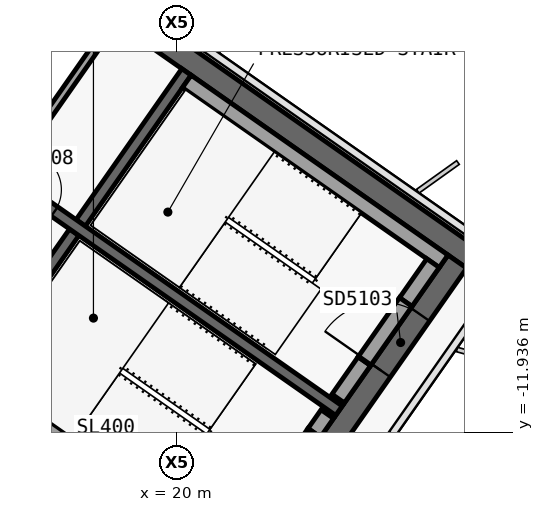
"""IFC4 building model, lengths in metres.
Left out: names, types, materials, properties, quantities, classifications, styles, units other than length and angle.
Written with IfcOpenShell. Run it as: python <this file> out.ifc"""

import sys

from ifc_helpers import new_model, si_unit, direction, frame, frame_2d, origin, place, context, subcontext, project, spatial, polyline, rectangle, outline, extrude, element, fill, save


model = new_model("IFC4")
c1 = context("Model", 3, precision=1e-05, world=origin(), true_north=direction((0.0, 1.0)))
c2 = subcontext(c1, "Body", "Model", "MODEL_VIEW")
j1 = project(units=[si_unit("LENGTHUNIT", "METRE"), si_unit("PLANEANGLEUNIT", "RADIAN")], contexts=[c1])
p1 = place(None, origin())
s1 = spatial("IfcSite", under=j1, at=p1, CompositionType="ELEMENT")
p2 = place(p1, origin())
s2 = spatial("IfcBuilding", under=s1, at=p2, CompositionType="ELEMENT")
p3 = place(p2, frame((0.0, 0.0, 287.8)))
s3 = spatial("IfcBuildingStorey", under=s2, at=p3, CompositionType="ELEMENT", Elevation=287.8)
p4 = place(p3, frame((0.028, 12.066, 0.0), z_axis=(0.0, 0.0, 1.0), x_axis=(0.819151382952, -0.573577380837, 0.0)))
e1 = element("IfcWall", 1, at=p4, inside=s3, PredefinedType="SHEAR", context=c2, shape_type="SweptSolid", body=[
    extrude(outline(polyline([(33.898, 0.3), (0.0, 0.3), (0.42, -0.3), (33.898, -0.3), (33.898, 0.3)])), origin(), (0.0, 0.0, 1.0), 3.9),
])
p5 = place(p3, frame((0.028, -0.874, 0.0), z_axis=(0.0, 0.0, 1.0), x_axis=(0.819150035022, -0.573579305871, 0.0)))
e2 = element("IfcWall", 2, at=p5, inside=s3, PredefinedType="SHEAR", context=c2, shape_type="SweptSolid", body=[
    extrude(outline(polyline([(26.476, 0.3), (0.0, 0.3), (0.42, -0.3), (26.476, -0.3), (26.476, 0.3)])), origin(), (0.0, 0.0, 1.0), 3.9),
])
p6 = place(p5, frame((1.026, 0.0, 0.0)))
e3 = element("IfcOpeningElement", 3, at=p6, cuts=e2, PredefinedType="OPENING", context=c2, shape_type="SweptSolid", body=[
    extrude(rectangle(XDim=1.5, YDim=2.1, at=frame_2d((0.75, 1.05))), frame((0.0, 0.31, 0.0), z_axis=(0.0, -1.0, 0.0), x_axis=(1.0, 0.0, 0.0)), (0.0, 0.0, 1.0), 0.62),
])
p7 = place(p5, frame((12.226, 0.0, 0.0)))
e4 = element("IfcOpeningElement", 4, at=p7, cuts=e2, PredefinedType="OPENING", context=c2, shape_type="SweptSolid", body=[
    extrude(rectangle(XDim=1.5, YDim=2.1, at=frame_2d((0.75, 1.05))), frame((0.0, 0.31, 0.0), z_axis=(0.0, -1.0, 0.0), x_axis=(1.0, 0.0, 0.0)), (0.0, 0.0, 1.0), 0.62),
])
p8 = place(p3, frame((21.642, -15.642, 0.0), z_axis=(0.0, 0.0, 1.0), x_axis=(0.573586866468, 0.819144740944, 0.0)))
e5 = element("IfcWall", 5, at=p8, inside=s3, PredefinedType="SHEAR", context=c2, shape_type="SweptSolid", body=[
    extrude(outline(polyline([(10.0, 0.3), (0.0, 0.3), (0.0, -0.3), (10.0, -0.3), (10.0, 0.3)])), origin(), (0.0, 0.0, 1.0), 3.9),
])
p9 = place(p8, frame((6.5, 0.0, 0.0)))
e6 = element("IfcOpeningElement", 6, at=p9, cuts=e5, PredefinedType="OPENING", context=c2, shape_type="SweptSolid", body=[
    extrude(rectangle(XDim=1.8, YDim=2.1, at=frame_2d((0.9, 1.05))), frame((0.0, 0.31, 0.0), z_axis=(0.0, -1.0, 0.0), x_axis=(1.0, 0.0, 0.0)), (0.0, 0.0, 1.0), 0.62),
])
p10 = place(p8, frame((2.3, 0.0, 0.0)))
e7 = element("IfcOpeningElement", 7, at=p10, cuts=e5, PredefinedType="OPENING", context=c2, shape_type="SweptSolid", body=[
    extrude(rectangle(XDim=1.8, YDim=2.1, at=frame_2d((0.9, 1.05))), frame((0.0, 0.31, 0.0), z_axis=(0.0, -1.0, 0.0), x_axis=(1.0, 0.0, 0.0)), (0.0, 0.0, 1.0), 0.62),
])
p11 = place(p3, frame((14.515, -10.652, 0.0), z_axis=(0.0, 0.0, 1.0), x_axis=(0.573560315113, 0.819163332265, 0.0)))
e8 = element("IfcWall", 8, at=p11, inside=s3, PredefinedType="SHEAR", context=c2, shape_type="SweptSolid", body=[
    extrude(outline(polyline([(0.0, 0.15), (0.0, -0.15), (4.85, -0.15), (4.85, 0.15), (0.0, 0.15)])), origin(), (0.0, 0.0, 1.0), 3.9),
])
p12 = place(p3, frame((17.469, -6.433, 0.0), z_axis=(0.0, 0.0, 1.0), x_axis=(0.573594092424, 0.81913968109, 0.0)))
e9 = element("IfcWall", 9, at=p12, inside=s3, PredefinedType="SHEAR", context=c2, shape_type="SweptSolid", body=[
    extrude(outline(polyline([(4.85, -0.15), (4.85, 0.15), (0.0, 0.15), (0.0, -0.15), (4.85, -0.15)])), origin(), (0.0, 0.0, 1.0), 3.9),
])
p13 = place(p3, frame((2.638, 3.768, 0.0), z_axis=(0.0, 0.0, 1.0), x_axis=(0.819155014212, -0.573572194837, 0.0)))
e10 = element("IfcWall", 10, at=p13, inside=s3, PredefinedType="SHEAR", context=c2, shape_type="SweptSolid", body=[
    extrude(outline(polyline([(0.0, 0.15), (0.0, -0.15), (26.4, -0.15), (26.4, 0.15), (0.0, 0.15)])), origin(), (0.0, 0.0, 1.0), 3.9),
])
p14 = place(p13, frame((9.637, 0.0, 0.0)))
e11 = element("IfcOpeningElement", 11, at=p14, cuts=e10, PredefinedType="OPENING", context=c2, shape_type="SweptSolid", body=[
    extrude(rectangle(XDim=1.2, YDim=2.1, at=frame_2d((0.6, 1.05))), frame((0.0, 0.16, 0.0), z_axis=(0.0, -1.0, 0.0), x_axis=(1.0, 0.0, 0.0)), (0.0, 0.0, 1.0), 0.32),
])
p15 = place(p13, frame((11.812, 0.0, 0.0)))
e12 = element("IfcOpeningElement", 12, at=p15, cuts=e10, PredefinedType="OPENING", context=c2, shape_type="SweptSolid", body=[
    extrude(rectangle(XDim=1.2, YDim=2.1, at=frame_2d((0.6, 1.05))), frame((0.0, 0.16, 0.0), z_axis=(0.0, -1.0, 0.0), x_axis=(1.0, 0.0, 0.0)), (0.0, 0.0, 1.0), 0.32),
])
p16 = place(p13, frame((13.988, 0.0, 0.0)))
e13 = element("IfcOpeningElement", 13, at=p16, cuts=e10, PredefinedType="OPENING", context=c2, shape_type="SweptSolid", body=[
    extrude(rectangle(XDim=1.2, YDim=2.1, at=frame_2d((0.6, 1.05))), frame((0.0, 0.16, 0.0), z_axis=(0.0, -1.0, 0.0), x_axis=(1.0, 0.0, 0.0)), (0.0, 0.0, 1.0), 0.32),
])
p17 = place(p13, frame((16.262, 0.0, 0.0)))
e14 = element("IfcOpeningElement", 14, at=p17, cuts=e10, PredefinedType="OPENING", context=c2, shape_type="SweptSolid", body=[
    extrude(rectangle(XDim=1.0, YDim=2.1, at=frame_2d((0.5, 1.05))), frame((0.0, 0.16, 0.0), z_axis=(0.0, -1.0, 0.0), x_axis=(1.0, 0.0, 0.0)), (0.0, 0.0, 1.0), 0.32),
])
p18 = place(p3, frame((15.565, -5.1, 0.0), z_axis=(0.0, 0.0, 1.0), x_axis=(0.573560315113, 0.819163332265, 0.0)))
e15 = element("IfcWall", 15, at=p18, inside=s3, PredefinedType="SOLIDWALL", context=c2, shape_type="SweptSolid", body=[
    extrude(rectangle(XDim=4.85, YDim=0.2, at=frame_2d((2.425, 0.0))), origin(), (0.0, 0.0, 1.0), 3.9),
])
p19 = place(p3, frame((20.259, -2.71, 0.0), z_axis=(0.0, 0.0, 1.0), x_axis=(0.81914849389, -0.573581506813, 0.0)))
e16 = element("IfcWall", 16, at=p19, inside=s3, PredefinedType="SOLIDWALL", context=c2, shape_type="SweptSolid", body=[
    extrude(rectangle(XDim=8.25, YDim=0.4, at=frame_2d((4.125, 0.0))), origin(), (0.0, 0.0, 1.0), 3.62),
])
p20 = place(p3, frame((24.244, -11.055, 0.0), z_axis=(0.0, 0.0, 1.0), x_axis=(0.573571582932, 0.819155442668, 0.0)))
e17 = element("IfcWall", 17, at=p20, inside=s3, PredefinedType="SOLIDWALL", context=c2, shape_type="SweptSolid", body=[
    extrude(rectangle(XDim=1.2, YDim=0.4, at=frame_2d((0.6, 0.0))), origin(), (0.0, 0.0, 1.0), 3.62),
])
p21 = place(p3, frame((26.022, -8.515, 0.0), z_axis=(0.0, 0.0, 1.0), x_axis=(0.573619628835, 0.819121798889, 0.0)))
e18 = element("IfcWall", 18, at=p21, inside=s3, PredefinedType="SOLIDWALL", context=c2, shape_type="SweptSolid", body=[
    extrude(rectangle(XDim=1.25, YDim=0.4, at=frame_2d((0.625, 0.0))), origin(), (0.0, 0.0, 1.0), 3.62),
])
p22 = place(p3, frame((24.932, -10.072, 2.15), z_axis=(0.0, 0.0, 1.0), x_axis=(0.573591692345, 0.819141361715, 0.0)))
e19 = element("IfcWall", 19, at=p22, inside=s3, PredefinedType="SOLIDWALL", context=c2, shape_type="SweptSolid", body=[
    extrude(rectangle(XDim=1.9, YDim=0.4, at=frame_2d((0.95, 0.0))), origin(), (0.0, 0.0, 1.0), 1.47),
])
p23 = place(p3, frame((14.753, -10.574, 0.0), z_axis=(0.0, 0.0, 1.0), x_axis=(0.819158229677, -0.573567602601, 0.0)))
e20 = element("IfcWall", 20, at=p23, inside=s3, PredefinedType="SOLIDWALL", context=c2, shape_type="SweptSolid", body=[
    extrude(rectangle(XDim=8.25, YDim=0.4, at=frame_2d((4.125, 0.0))), origin(), (0.0, 0.0, 1.0), 3.62),
])
p24 = place(p3, frame((23.613, -11.956, 0.0), z_axis=(0.0, 0.0, 1.0), x_axis=(0.573435029941, 0.819251039936, 0.0)))
e21 = element("IfcWall", 21, at=p24, inside=s3, PredefinedType="SOLIDWALL", context=c2, shape_type="SweptSolid", body=[
    extrude(rectangle(XDim=0.6, YDim=0.4, at=frame_2d((0.3, 0.0))), origin(), (0.0, 0.0, 1.0), 3.62),
])
p25 = place(p3, frame((22.523, -13.512, 2.15), z_axis=(0.0, 0.0, 1.0), x_axis=(0.573591692345, 0.819141361715, 0.0)))
e22 = element("IfcWall", 22, at=p25, inside=s3, PredefinedType="SOLIDWALL", context=c2, shape_type="SweptSolid", body=[
    extrude(rectangle(XDim=1.9, YDim=0.4, at=frame_2d((0.95, 0.0))), origin(), (0.0, 0.0, 1.0), 1.47),
])
p26 = place(p3, frame((20.513, -17.781, 0.0), z_axis=(0.0, 0.0, 1.0), x_axis=(-0.819153544995, 0.573574293115, 0.0)))
e23 = element("IfcWall", 23, at=p26, inside=s3, PredefinedType="PARTITIONING", context=c2, shape_type="SweptSolid", body=[
    extrude(rectangle(XDim=18.002, YDim=0.15, at=frame_2d((9.001, 0.0))), origin(), (0.0, 0.0, 1.0), 3.05),
])
p27 = place(p26, frame((8.201, 0.0, 0.0)))
e24 = element("IfcOpeningElement", 24, at=p27, cuts=e23, PredefinedType="OPENING", context=c2, shape_type="SweptSolid", body=[
    extrude(rectangle(XDim=1.6, YDim=2.1, at=frame_2d((0.8, 1.05))), frame((0.0, 0.085, 0.0), z_axis=(0.0, -1.0, 0.0), x_axis=(1.0, 0.0, 0.0)), (0.0, 0.0, 1.0), 0.17),
])
p28 = place(p3, frame((18.503, -20.648, 0.0), z_axis=(0.0, 0.0, 1.0), x_axis=(-0.819154173185, 0.573573395961, 0.0)))
e25 = element("IfcWall", 25, at=p28, inside=s3, PredefinedType="PARTITIONING", context=c2, shape_type="SweptSolid", body=[
    extrude(rectangle(XDim=18.0, YDim=0.1, at=frame_2d((9.0, 0.0))), origin(), (0.0, 0.0, 1.0), 3.05),
])
p29 = place(p28, frame((8.55, 0.0, 0.0)))
e26 = element("IfcOpeningElement", 26, at=p29, cuts=e25, PredefinedType="OPENING", context=c2, shape_type="SweptSolid", body=[
    extrude(rectangle(XDim=0.9, YDim=2.1, at=frame_2d((0.45, 1.05))), frame((0.0, 0.06, 0.0), z_axis=(0.0, -1.0, 0.0), x_axis=(1.0, 0.0, 0.0)), (0.0, 0.0, 1.0), 0.12),
])
p30 = place(p17, origin())
e27 = element("IfcDoor", 27, at=p30, inside=s3, OperationType="SINGLE_SWING_RIGHT", PredefinedType="DOOR", context=c2, shape_type="SweptSolid", body=[
    extrude(rectangle(XDim=1.0, YDim=2.1, at=frame_2d((0.5, 1.05))), frame((0.0, 0.025, 0.0), z_axis=(0.0, -1.0, 0.0), x_axis=(1.0, 0.0, 0.0)), (0.0, 0.0, 1.0), 0.05),
])
fill(e14, e27)
p31 = place(p9, origin())
e28 = element("IfcDoor", 28, at=p31, inside=s3, OperationType="DOUBLE_DOOR_SINGLE_SWING", PredefinedType="DOOR", context=c2, shape_type="SweptSolid", body=[
    extrude(rectangle(XDim=1.8, YDim=2.1, at=frame_2d((0.9, 1.05))), frame((0.0, 0.025, 0.0), z_axis=(0.0, -1.0, 0.0), x_axis=(1.0, 0.0, 0.0)), (0.0, 0.0, 1.0), 0.05),
])
fill(e6, e28)
save(model, sys.argv[1])
